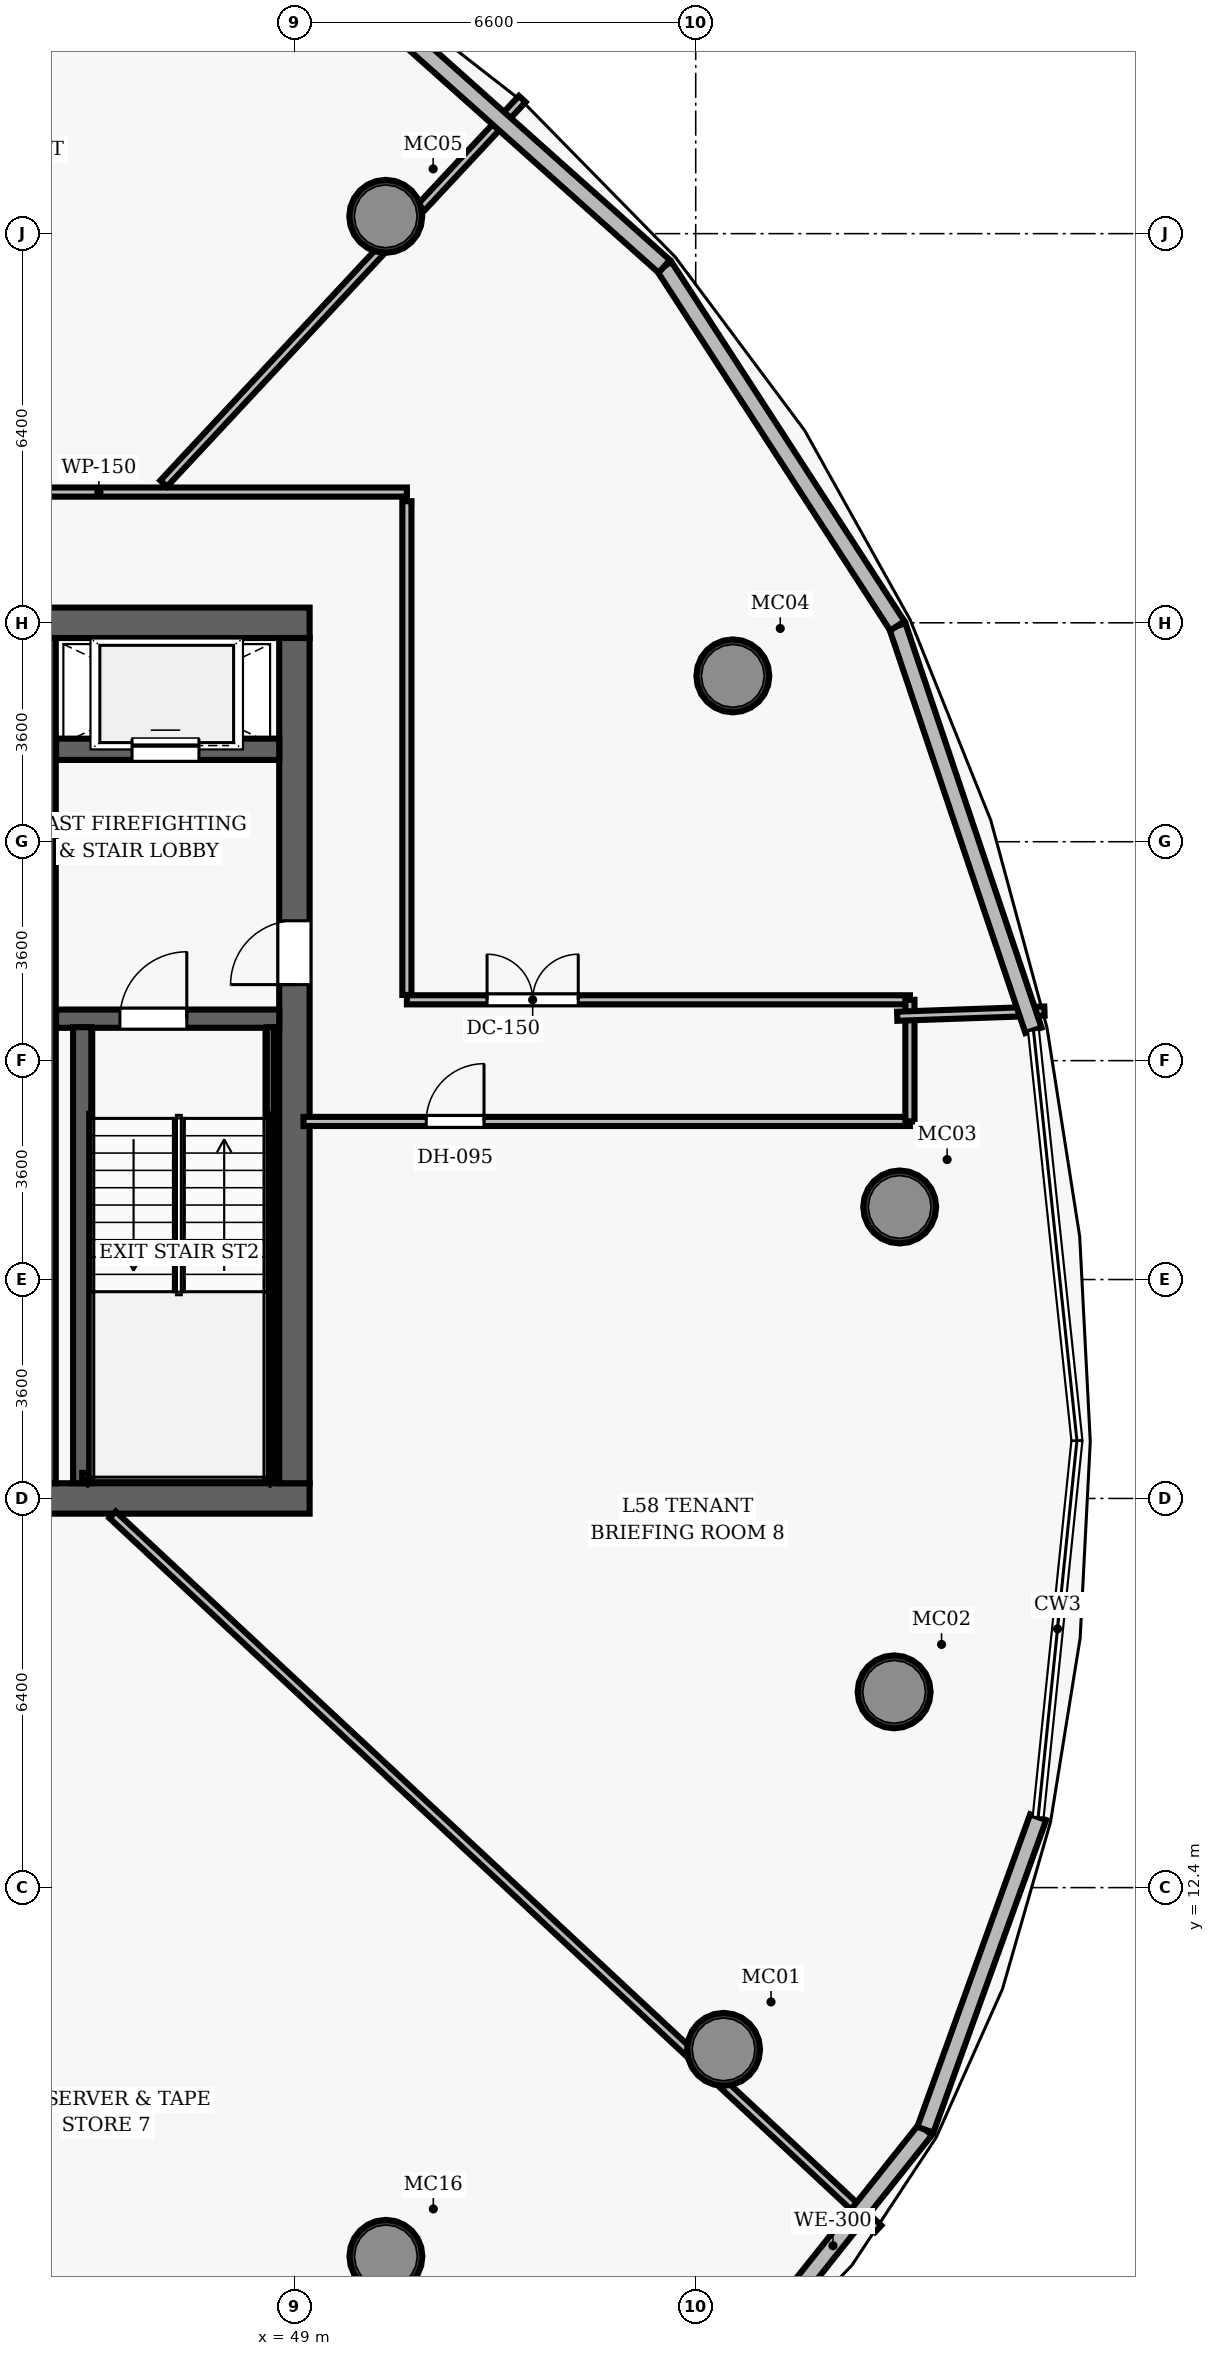
"""IFC4 building model, lengths in metres.
Left out: names, types, materials, properties, quantities, classifications, styles, units other than length and angle.
Written with IfcOpenShell. Run it as: python <this file> out.ifc"""

import sys

from ifc_helpers import new_model, si_unit, direction, frame, frame_2d, origin, origin_2d, place, context, subcontext, project, spatial, rectangle, hollow_circle, extrude, element, fill, save


model = new_model("IFC4")
c1 = context("Model", 3, precision=1e-05, world=origin(), true_north=direction((0.0, 1.0)))
c2 = subcontext(c1, "Body", "Model", "MODEL_VIEW")
j1 = project(units=[si_unit("LENGTHUNIT", "METRE"), si_unit("PLANEANGLEUNIT", "RADIAN")], contexts=[c1])
p1 = place(None, origin())
s1 = spatial("IfcSite", under=j1, at=p1, CompositionType="ELEMENT")
p2 = place(p1, origin())
s2 = spatial("IfcBuilding", under=s1, at=p2, CompositionType="ELEMENT")
p3 = place(p2, frame((0.0, 0.0, 228.95)))
s3 = spatial("IfcBuildingStorey", under=s2, at=p3, CompositionType="ELEMENT", Elevation=228.95)
p4 = place(p3, frame((26.75, 18.8, 0.0), z_axis=(0.0, 0.0, 1.0), x_axis=(1.0, 0.0, 0.0)))
e1 = element("IfcWall", 1, at=p4, inside=s3, PredefinedType="SHEAR", context=c2, shape_type="SweptSolid", body=[
    extrude(rectangle(XDim=22.5, YDim=0.5, at=frame_2d((11.25, 0.0))), origin(), (0.0, 0.0, 1.0), 3.85),
])
p5 = place(p4, frame((14.47, 0.0, 0.0)))
e2 = element("IfcOpeningElement", 2, at=p5, cuts=e1, PredefinedType="OPENING", context=c2, shape_type="SweptSolid", body=[
    extrude(rectangle(XDim=1.05, YDim=2.15, at=frame_2d((0.525, 1.075))), frame((0.0, 0.26, 0.0), z_axis=(0.0, -1.0, 0.0), x_axis=(1.0, 0.0, 0.0)), (0.0, 0.0, 1.0), 0.52),
])
p6 = place(p3, frame((26.75, 33.2, 0.0), z_axis=(0.0, 0.0, 1.0), x_axis=(1.0, 0.0, 0.0)))
e3 = element("IfcWall", 3, at=p6, inside=s3, PredefinedType="SHEAR", context=c2, shape_type="SweptSolid", body=[
    extrude(rectangle(XDim=22.5, YDim=0.5, at=frame_2d((11.25, 0.0))), origin(), (0.0, 0.0, 1.0), 3.85),
])
p7 = place(p6, frame((4.57, 0.0, 0.0)))
e4 = element("IfcOpeningElement", 4, at=p7, cuts=e3, PredefinedType="OPENING", context=c2, shape_type="SweptSolid", body=[
    extrude(rectangle(XDim=1.05, YDim=2.15, at=frame_2d((0.525, 1.075))), frame((0.0, 0.26, 0.0), z_axis=(0.0, -1.0, 0.0), x_axis=(1.0, 0.0, 0.0)), (0.0, 0.0, 1.0), 0.52),
])
p8 = place(p6, frame((14.47, 0.0, 0.0)))
e5 = element("IfcOpeningElement", 5, at=p8, cuts=e3, PredefinedType="OPENING", context=c2, shape_type="SweptSolid", body=[
    extrude(rectangle(XDim=1.05, YDim=2.15, at=frame_2d((0.525, 1.075))), frame((0.0, 0.26, 0.0), z_axis=(0.0, -1.0, 0.0), x_axis=(1.0, 0.0, 0.0)), (0.0, 0.0, 1.0), 0.52),
])
p9 = place(p3, frame((49.0, 19.05, 0.0), z_axis=(0.0, 0.0, 1.0), x_axis=(0.0, 1.0, 0.0)))
e6 = element("IfcWall", 6, at=p9, inside=s3, PredefinedType="SHEAR", context=c2, shape_type="SweptSolid", body=[
    extrude(rectangle(XDim=13.9, YDim=0.5, at=frame_2d((6.95, 0.0))), origin(), (0.0, 0.0, 1.0), 3.85),
])
p10 = place(p9, frame((8.2, 0.0, 0.0)))
e7 = element("IfcOpeningElement", 7, at=p10, cuts=e6, PredefinedType="OPENING", context=c2, shape_type="SweptSolid", body=[
    extrude(rectangle(XDim=1.05, YDim=2.15, at=frame_2d((0.525, 1.075))), frame((0.0, 0.26, 0.0), z_axis=(0.0, -1.0, 0.0), x_axis=(1.0, 0.0, 0.0)), (0.0, 0.0, 1.0), 0.52),
])
p11 = place(p3, frame((44.9, 19.05, 0.0), z_axis=(0.0, 0.0, 1.0), x_axis=(0.0, 1.0, 0.0)))
e8 = element("IfcWall", 8, at=p11, inside=s3, PredefinedType="SHEAR", context=c2, shape_type="SweptSolid", body=[
    extrude(rectangle(XDim=13.9, YDim=0.35, at=frame_2d((6.95, 0.0))), origin(), (0.0, 0.0, 1.0), 3.85),
])
for number, where, z_axis, x_axis in (
    (9, (56.058, 9.74, 0.0), (0.0, 0.0, 1.0), (1.0, 0.0, 0.0)),
    (10, (58.863, 15.619, 0.0), (0.0, 0.0, 1.0), (1.0, 0.0, 0.0)),
    (11, (58.955, 23.594, 0.0), (0.0, 0.0, 1.0), (1.0, 0.0, 0.0)),
    (12, (56.21, 32.327, 0.0), (0.0, 0.0, 1.0), (1.0, 0.0, 0.0)),
    (13, (50.502, 39.885, 0.0), (0.0, 0.0, 1.0), (1.0, 0.0, 0.0)),
    (14, (50.504, 6.336, 0.0), (0.0, 0.0, 1.0), (1.0, 0.0, 0.0)),
):
    element("IfcColumn", number, at=place(p3, frame(where, z_axis=z_axis, x_axis=x_axis)), inside=s3, PredefinedType="COLUMN", context=c2, shape_type="SweptSolid", body=[
        extrude(hollow_circle(Radius=0.6, WallThickness=0.05, at=origin_2d()), origin(), (0.0, 0.0, 1.0), 3.85),
    ])
p12 = place(p3, frame((45.08, 26.69, 0.0), z_axis=(0.0, 0.0, 1.0), x_axis=(1.0, 0.0, 0.0)))
e15 = element("IfcWall", 15, at=p12, inside=s3, PredefinedType="SHEAR", context=c2, shape_type="SweptSolid", body=[
    extrude(rectangle(XDim=3.67, YDim=0.3, at=frame_2d((1.835, 0.0))), origin(), (0.0, 0.0, 1.0), 3.85),
])
p13 = place(p12, frame((1.05, 0.0, 0.0)))
e16 = element("IfcOpeningElement", 16, at=p13, cuts=e15, PredefinedType="OPENING", context=c2, shape_type="SweptSolid", body=[
    extrude(rectangle(XDim=1.1, YDim=2.15, at=frame_2d((0.55, 1.075))), frame((0.0, 0.16, 0.0), z_axis=(0.0, -1.0, 0.0), x_axis=(1.0, 0.0, 0.0)), (0.0, 0.0, 1.0), 0.32),
])
p14 = place(p3, frame((45.51, 19.05, 0.0), z_axis=(0.0, 0.0, 1.0), x_axis=(0.0, 1.0, 0.0)))
e17 = element("IfcWall", 17, at=p14, inside=s3, PredefinedType="SHEAR", context=c2, shape_type="SweptSolid", body=[
    extrude(rectangle(XDim=7.5, YDim=0.3, at=frame_2d((3.75, 0.0))), origin(), (0.0, 0.0, 1.0), 3.85),
])
p15 = place(p3, frame((48.605, 19.1, 0.0), z_axis=(0.0, 0.0, 1.0), x_axis=(0.0, 1.0, 0.0)))
e18 = element("IfcWall", 18, at=p15, inside=s3, PredefinedType="SHEAR", context=c2, shape_type="SweptSolid", body=[
    extrude(rectangle(XDim=7.45, YDim=0.12, at=frame_2d((3.725, 0.0))), origin(), (0.0, 0.0, 1.0), 3.85),
])
p16 = place(p3, frame((45.51, 19.16, 0.0), z_axis=(0.0, 0.0, 1.0), x_axis=(1.0, 0.0, 0.0)))
e19 = element("IfcWall", 19, at=p16, inside=s3, PredefinedType="SHEAR", context=c2, shape_type="SweptSolid", body=[
    extrude(rectangle(XDim=3.095, YDim=0.12, at=frame_2d((1.547, 0.0))), origin(), (0.0, 0.0, 1.0), 3.85),
])
p17 = place(p3, frame((45.08, 31.12, 0.0), z_axis=(0.0, 0.0, 1.0), x_axis=(1.0, 0.0, 0.0)))
e20 = element("IfcWall", 20, at=p17, inside=s3, PredefinedType="SHEAR", context=c2, shape_type="SweptSolid", body=[
    extrude(rectangle(XDim=3.67, YDim=0.35, at=frame_2d((1.835, 0.0))), origin(), (0.0, 0.0, 1.0), 3.035),
])
p18 = place(p17, frame((1.25, 0.0, 0.0)))
e21 = element("IfcOpeningElement", 21, at=p18, cuts=e20, PredefinedType="OPENING", context=c2, shape_type="SweptSolid", body=[
    extrude(rectangle(XDim=1.1, YDim=2.15, at=frame_2d((0.55, 1.075))), frame((0.0, 0.185, 0.0), z_axis=(0.0, -1.0, 0.0), x_axis=(1.0, 0.0, 0.0)), (0.0, 0.0, 1.0), 0.37),
])
p19 = place(p3, frame((24.85, 35.35, 0.0), z_axis=(0.0, 0.0, 1.0), x_axis=(1.0, 0.0, 0.0)))
e22 = element("IfcWall", 22, at=p19, inside=s3, PredefinedType="PARTITIONING", context=c2, shape_type="SweptSolid", body=[
    extrude(rectangle(XDim=26.0, YDim=0.15, at=frame_2d((13.0, 0.0))), origin(), (0.0, 0.0, 1.0), 3.035),
])
p20 = place(p19, frame((14.219, 0.0, 0.0)))
e23 = element("IfcOpeningElement", 23, at=p20, cuts=e22, PredefinedType="OPENING", context=c2, shape_type="SweptSolid", body=[
    extrude(rectangle(XDim=1.5, YDim=2.2, at=frame_2d((0.75, 1.1))), frame((0.0, 0.085, 0.0), z_axis=(0.0, -1.0, 0.0), x_axis=(1.0, 0.0, 0.0)), (0.0, 0.0, 1.0), 0.17),
])
p21 = place(p19, frame((5.566, 0.0, 0.0)))
e24 = element("IfcOpeningElement", 24, at=p21, cuts=e22, PredefinedType="OPENING", context=c2, shape_type="SweptSolid", body=[
    extrude(rectangle(XDim=1.5, YDim=2.2, at=frame_2d((0.75, 1.1))), frame((0.0, 0.085, 0.0), z_axis=(0.0, -1.0, 0.0), x_axis=(1.0, 0.0, 0.0)), (0.0, 0.0, 1.0), 0.17),
])
p22 = place(p3, frame((50.85, 27.08, 0.0), z_axis=(0.0, 0.0, 1.0), x_axis=(0.0, 1.0, 0.0)))
e25 = element("IfcWall", 25, at=p22, inside=s3, PredefinedType="PARTITIONING", context=c2, shape_type="SweptSolid", body=[
    extrude(rectangle(XDim=8.12, YDim=0.15, at=frame_2d((4.06, 0.0))), origin(), (0.0, 0.0, 1.0), 3.035),
])
p23 = place(p3, frame((50.85, 27.0, 0.0), z_axis=(0.0, 0.0, 1.0), x_axis=(1.0, 0.0, 0.0)))
e26 = element("IfcWall", 26, at=p23, inside=s3, PredefinedType="PARTITIONING", context=c2, shape_type="SweptSolid", body=[
    extrude(rectangle(XDim=8.273, YDim=0.15, at=frame_2d((4.136, 0.0))), origin(), (0.0, 0.0, 1.0), 3.035),
])
p24 = place(p23, frame((1.318, 0.0, 0.0)))
e27 = element("IfcOpeningElement", 27, at=p24, cuts=e26, PredefinedType="OPENING", context=c2, shape_type="SweptSolid", body=[
    extrude(rectangle(XDim=1.5, YDim=2.2, at=frame_2d((0.75, 1.1))), frame((0.0, 0.085, 0.0), z_axis=(0.0, -1.0, 0.0), x_axis=(1.0, 0.0, 0.0)), (0.0, 0.0, 1.0), 0.17),
])
p25 = place(p3, frame((49.15, 25.0, 0.0), z_axis=(0.0, 0.0, 1.0), x_axis=(1.0, 0.0, 0.0)))
e28 = element("IfcWall", 28, at=p25, inside=s3, PredefinedType="PARTITIONING", context=c2, shape_type="SweptSolid", body=[
    extrude(rectangle(XDim=9.973, YDim=0.15, at=frame_2d((4.986, 0.0))), origin(), (0.0, 0.0, 1.0), 3.035),
])
p26 = place(p25, frame((2.018, 0.0, 0.0)))
e29 = element("IfcOpeningElement", 29, at=p26, cuts=e28, PredefinedType="OPENING", context=c2, shape_type="SweptSolid", body=[
    extrude(rectangle(XDim=0.95, YDim=2.15, at=frame_2d((0.475, 1.075))), frame((0.0, 0.085, 0.0), z_axis=(0.0, -1.0, 0.0), x_axis=(1.0, 0.0, 0.0)), (0.0, 0.0, 1.0), 0.17),
])
p27 = place(p3, frame((59.123, 25.0, 0.0), z_axis=(0.0, 0.0, 1.0), x_axis=(0.0, 1.0, 0.0)))
e30 = element("IfcWall", 30, at=p27, inside=s3, PredefinedType="PARTITIONING", context=c2, shape_type="SweptSolid", body=[
    extrude(rectangle(XDim=2.0, YDim=0.15, at=frame_2d((1.0, 0.0))), origin(), (0.0, 0.0, 1.0), 3.035),
])
p28 = place(p3, frame((58.914, 26.73, 0.0), z_axis=(0.0, 0.0, 1.0), x_axis=(0.999388643171, 0.034961977939, 0.0)))
e31 = element("IfcWall", 31, at=p28, inside=s3, PredefinedType="PARTITIONING", context=c2, shape_type="SweptSolid", body=[
    extrude(rectangle(XDim=2.423, YDim=0.15, at=frame_2d((1.211, 0.0))), origin(), (0.0, 0.0, 1.0), 3.035),
])
p29 = place(p3, frame((46.85, 35.49, 0.0), z_axis=(0.0, 0.0, 1.0), x_axis=(0.68200031128, 0.731351882075, 0.0)))
e32 = element("IfcWall", 32, at=p29, inside=s3, PredefinedType="PARTITIONING", context=c2, shape_type="SweptSolid", body=[
    extrude(rectangle(XDim=8.647, YDim=0.15, at=frame_2d((4.324, 0.0))), origin(), (0.0, 0.0, 1.0), 3.035),
])
p30 = place(p3, frame((46.01, 18.53, 0.0), z_axis=(0.0, 0.0, 1.0), x_axis=(0.731353262769, -0.681998830671, 0.0)))
e33 = element("IfcWall", 33, at=p30, inside=s3, PredefinedType="PARTITIONING", context=c2, shape_type="SweptSolid", body=[
    extrude(rectangle(XDim=17.214, YDim=0.15, at=frame_2d((8.607, 0.0))), origin(), (0.0, 0.0, 1.0), 3.035),
])
p31 = place(p3, frame((59.377, 8.418, 0.0), z_axis=(0.0, 0.0, 1.0), x_axis=(-0.622977845152, -0.782239480242, 0.0)))
e34 = element("IfcWall", 34, at=p31, inside=s3, PredefinedType="SOLIDWALL", context=c2, shape_type="SweptSolid", body=[
    extrude(rectangle(XDim=4.876, YDim=0.28, at=frame_2d((2.438, 0.0))), origin(), (0.0, 0.0, 1.0), 3.62),
])
p32 = place(p3, frame((61.232, 13.558, 0.0), z_axis=(0.0, 0.0, 1.0), x_axis=(-0.339467695369, -0.940617713952, 0.0)))
e35 = element("IfcWall", 35, at=p32, inside=s3, PredefinedType="SOLIDWALL", context=c2, shape_type="SweptSolid", body=[
    extrude(rectangle(XDim=5.464, YDim=0.28, at=frame_2d((2.732, 0.0))), origin(), (0.0, 0.0, 1.0), 3.62),
])
p33 = place(p3, frame((58.915, 33.149, 0.0), z_axis=(0.0, 0.0, 1.0), x_axis=(0.319117243221, -0.947715244722, 0.0)))
e36 = element("IfcWall", 36, at=p33, inside=s3, PredefinedType="SOLIDWALL", context=c2, shape_type="SweptSolid", body=[
    extrude(rectangle(XDim=7.018, YDim=0.28, at=frame_2d((3.509, 0.0))), origin(), (0.0, 0.0, 1.0), 3.62),
])
p34 = place(p3, frame((55.083, 39.061, 0.0), z_axis=(0.0, 0.0, 1.0), x_axis=(0.543970915448, -0.839104071702, 0.0)))
e37 = element("IfcWall", 37, at=p34, inside=s3, PredefinedType="SOLIDWALL", context=c2, shape_type="SweptSolid", body=[
    extrude(rectangle(XDim=7.045, YDim=0.28, at=frame_2d((3.523, 0.0))), origin(), (0.0, 0.0, 1.0), 3.62),
])
p35 = place(p3, frame((49.827, 43.753, 0.0), z_axis=(0.0, 0.0, 1.0), x_axis=(0.746012050709, -0.665932444169, 0.0)))
e38 = element("IfcWall", 38, at=p35, inside=s3, PredefinedType="SOLIDWALL", context=c2, shape_type="SweptSolid", body=[
    extrude(rectangle(XDim=7.046, YDim=0.28, at=frame_2d((3.523, 0.0))), origin(), (0.0, 0.0, 1.0), 3.62),
])
p36 = place(p13, origin())
e39 = element("IfcDoor", 39, at=p36, inside=s3, OperationType="SINGLE_SWING_RIGHT", PredefinedType="DOOR", context=c2, shape_type="SweptSolid", body=[
    extrude(rectangle(XDim=1.1, YDim=2.15, at=frame_2d((0.55, 1.075))), frame((0.0, 0.025, 0.0), z_axis=(0.0, -1.0, 0.0), x_axis=(1.0, 0.0, 0.0)), (0.0, 0.0, 1.0), 0.05),
])
fill(e16, e39)
p37 = place(p10, origin())
e40 = element("IfcDoor", 40, at=p37, inside=s3, OperationType="SINGLE_SWING_LEFT", PredefinedType="DOOR", context=c2, shape_type="SweptSolid", body=[
    extrude(rectangle(XDim=1.05, YDim=2.15, at=frame_2d((0.525, 1.075))), frame((0.0, 0.025, 0.0), z_axis=(0.0, -1.0, 0.0), x_axis=(1.0, 0.0, 0.0)), (0.0, 0.0, 1.0), 0.05),
])
fill(e7, e40)
p38 = place(p24, origin())
e41 = element("IfcDoor", 41, at=p38, inside=s3, OperationType="DOUBLE_DOOR_SINGLE_SWING", PredefinedType="DOOR", context=c2, shape_type="SweptSolid", body=[
    extrude(rectangle(XDim=1.5, YDim=2.2, at=frame_2d((0.75, 1.1))), frame((0.0, 0.025, 0.0), z_axis=(0.0, -1.0, 0.0), x_axis=(1.0, 0.0, 0.0)), (0.0, 0.0, 1.0), 0.05),
])
fill(e27, e41)
p39 = place(p26, origin())
e42 = element("IfcDoor", 42, at=p39, inside=s3, OperationType="SINGLE_SWING_RIGHT", PredefinedType="DOOR", context=c2, shape_type="SweptSolid", body=[
    extrude(rectangle(XDim=0.95, YDim=2.15, at=frame_2d((0.475, 1.075))), frame((0.0, 0.025, 0.0), z_axis=(0.0, -1.0, 0.0), x_axis=(1.0, 0.0, 0.0)), (0.0, 0.0, 1.0), 0.05),
])
fill(e29, e42)
p40 = place(p18, origin())
e43 = element("IfcDoor", 43, at=p40, inside=s3, OperationType="SLIDING_TO_LEFT", PredefinedType="DOOR", context=c2, shape_type="SweptSolid", body=[
    extrude(rectangle(XDim=1.1, YDim=2.15, at=frame_2d((0.55, 1.075))), frame((0.0, 0.025, 0.0), z_axis=(0.0, -1.0, 0.0), x_axis=(1.0, 0.0, 0.0)), (0.0, 0.0, 1.0), 0.05),
])
fill(e21, e43)
save(model, sys.argv[1])
